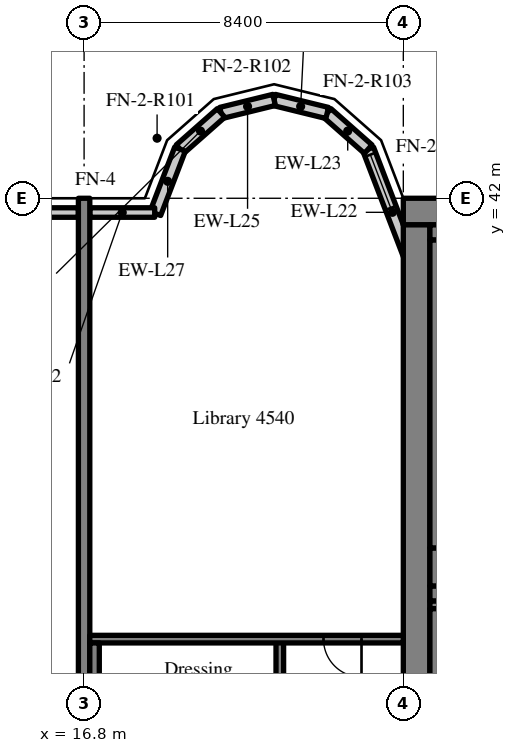
"""IFC4 building model, lengths in metres.
Left out: names, types, materials, properties, quantities, classifications, styles, units other than length and angle.
Written with IfcOpenShell. Run it as: python <this file> out.ifc"""

import sys

from ifc_helpers import new_model, si_unit, direction, frame, frame_2d, origin, place, context, subcontext, project, spatial, rectangle, extrude, source, transform, mapped, element, fill, save


model = new_model("IFC4")
c1 = context("Model", 3, precision=1e-05, world=origin(), true_north=direction((0.0, 1.0)))
c2 = subcontext(c1, "Body", "Model", "MODEL_VIEW")
j1 = project(units=[si_unit("LENGTHUNIT", "METRE"), si_unit("PLANEANGLEUNIT", "RADIAN")], contexts=[c1])
p1 = place(None, origin())
s1 = spatial("IfcSite", under=j1, at=p1, CompositionType="ELEMENT")
p2 = place(p1, origin())
s2 = spatial("IfcBuilding", under=s1, at=p2, CompositionType="ELEMENT")
p3 = place(p2, frame((0.0, 0.0, 185.8)))
s3 = spatial("IfcBuildingStorey", under=s2, at=p3, CompositionType="ELEMENT", Elevation=185.8)
m1 = source(origin(), c2, "Body", "SweptSolid", [
    extrude(rectangle(XDim=50.4, YDim=0.7, at=frame_2d((25.2, 0.0))), origin(), (0.0, 0.0, 1.0), 3.52),
])
p4 = place(p3, frame((25.2, 41.65, 0.0), z_axis=(0.0, 0.0, 1.0), x_axis=(1.0, 0.0, 0.0)))
e1 = element("IfcWall", 1, at=p4, inside=s3, PredefinedType="SHEAR", context=c2, shape_type="MappedRepresentation", body=[
    mapped(m1, transform((0.0, 0.0, 0.0), scale=1.0)),
])
m2 = source(origin(), c2, "Body", "SweptSolid", [
    extrude(rectangle(XDim=18.6, YDim=0.7, at=frame_2d((9.3, 0.0))), origin(), (0.0, 0.0, 1.0), 3.52),
])
p5 = place(p3, frame((25.55, 22.7, 0.0), z_axis=(0.0, 0.0, 1.0), x_axis=(0.0, 1.0, 0.0)))
e2 = element("IfcWall", 2, at=p5, inside=s3, PredefinedType="SHEAR", context=c2, shape_type="MappedRepresentation", body=[
    mapped(m2, transform((0.0, 0.0, 0.0), scale=1.0)),
])
m3 = source(origin(), c2, "Body", "SweptSolid", [
    extrude(rectangle(XDim=7.5, YDim=0.4, at=frame_2d((3.75, 0.0))), origin(), (0.0, 0.0, 1.0), 3.52),
])
p6 = place(p3, frame((25.9, 31.6, 0.0), z_axis=(0.0, 0.0, 1.0), x_axis=(1.0, 0.0, 0.0)))
e3 = element("IfcWall", 3, at=p6, inside=s3, PredefinedType="SHEAR", context=c2, shape_type="MappedRepresentation", body=[
    mapped(m3, transform((0.0, 0.0, 0.0), scale=1.0)),
])
m4 = source(origin(), c2, "Body", "SweptSolid", [
    extrude(rectangle(XDim=1.1, YDim=2.1, at=frame_2d((0.55, 1.05))), frame((0.0, 0.21, 0.0), z_axis=(0.0, -1.0, 0.0), x_axis=(1.0, 0.0, 0.0)), (0.0, 0.0, 1.0), 0.42),
])
p7 = place(p6, frame((5.825, 0.0, 0.0)))
e4 = element("IfcOpeningElement", 4, at=p7, cuts=e3, PredefinedType="OPENING", context=c2, shape_type="MappedRepresentation", body=[
    mapped(m4, transform((0.0, 0.0, 0.0), scale=1.0)),
])
m5 = source(origin(), c2, "Body", "SweptSolid", [
    extrude(rectangle(XDim=20.0, YDim=0.3, at=frame_2d((10.0, 0.0))), origin(), (0.0, 0.0, 1.0), 3.52),
])
p8 = place(p3, frame((16.8, 22.0, 0.0), z_axis=(0.0, 0.0, 1.0), x_axis=(0.0, 1.0, 0.0)))
e5 = element("IfcWall", 5, at=p8, inside=s3, PredefinedType="SHEAR", context=c2, shape_type="MappedRepresentation", body=[
    mapped(m5, transform((0.0, 0.0, 0.0), scale=1.0)),
])
m6 = source(origin(), c2, "Body", "SweptSolid", [
    extrude(rectangle(XDim=3.559, YDim=0.3, at=frame_2d((1.78, 0.0))), origin(), (0.0, 0.0, 1.0), 3.52),
])
p9 = place(p3, frame((25.55, 39.969, 0.0), z_axis=(0.0, 0.0, 1.0), x_axis=(-0.35779745313, 0.933799219604, 0.0)))
e6 = element("IfcWall", 6, at=p9, inside=s3, PredefinedType="SOLIDWALL", context=c2, shape_type="MappedRepresentation", body=[
    mapped(m6, transform((0.0, 0.0, 0.0), scale=1.0)),
])
m7 = source(origin(), c2, "Body", "SweptSolid", [
    extrude(rectangle(XDim=1.5, YDim=2.0, at=frame_2d((0.75, 1.0))), frame((0.0, 0.16, 0.0), z_axis=(0.0, -1.0, 0.0), x_axis=(1.0, 0.0, 0.0)), (0.0, 0.0, 1.0), 0.32),
])
p10 = place(p9, frame((1.903, 0.0, 0.9)))
e7 = element("IfcOpeningElement", 7, at=p10, cuts=e6, PredefinedType="OPENING", context=c2, shape_type="MappedRepresentation", body=[
    mapped(m7, transform((0.0, 0.0, 0.0), scale=1.0)),
])
m8 = source(origin(), c2, "Body", "SweptSolid", [
    extrude(rectangle(XDim=1.44, YDim=0.3, at=frame_2d((0.72, 0.0))), origin(), (0.0, 0.0, 1.0), 3.52),
])
p11 = place(p3, frame((24.277, 43.292, 0.0), z_axis=(0.0, 0.0, 1.0), x_axis=(-0.749649827867, 0.661834673902, 0.0)))
e8 = element("IfcWall", 8, at=p11, inside=s3, PredefinedType="SOLIDWALL", context=c2, shape_type="MappedRepresentation", body=[
    mapped(m8, transform((0.0, 0.0, 0.0), scale=1.0)),
])
m9 = source(origin(), c2, "Body", "SweptSolid", [
    extrude(rectangle(XDim=1.438, YDim=0.3, at=frame_2d((0.719, 0.0))), origin(), (0.0, 0.0, 1.0), 3.52),
])
p12 = place(p3, frame((23.197, 44.245, 0.0), z_axis=(0.0, 0.0, 1.0), x_axis=(-0.971152283879, 0.238460146601, 0.0)))
e9 = element("IfcWall", 9, at=p12, inside=s3, PredefinedType="SOLIDWALL", context=c2, shape_type="MappedRepresentation", body=[
    mapped(m9, transform((0.0, 0.0, 0.0), scale=1.0)),
])
m10 = source(origin(), c2, "Body", "SweptSolid", [
    extrude(rectangle(XDim=1.439, YDim=0.3, at=frame_2d((0.719, 0.0))), origin(), (0.0, 0.0, 1.0), 3.52),
])
p13 = place(p3, frame((21.8, 44.588, 0.0), z_axis=(0.0, 0.0, 1.0), x_axis=(-0.971161932466, -0.238420848351, 0.0)))
e10 = element("IfcWall", 10, at=p13, inside=s3, PredefinedType="SOLIDWALL", context=c2, shape_type="MappedRepresentation", body=[
    mapped(m10, transform((0.0, 0.0, 0.0), scale=1.0)),
])
m11 = source(origin(), c2, "Body", "SweptSolid", [
    extrude(rectangle(XDim=1.44, YDim=0.3, at=frame_2d((0.72, 0.0))), origin(), (0.0, 0.0, 1.0), 3.52),
])
p14 = place(p3, frame((20.403, 44.245, 0.0), z_axis=(0.0, 0.0, 1.0), x_axis=(-0.74957555648, -0.661918790432, 0.0)))
e11 = element("IfcWall", 11, at=p14, inside=s3, PredefinedType="SOLIDWALL", context=c2, shape_type="MappedRepresentation", body=[
    mapped(m11, transform((0.0, 0.0, 0.0), scale=1.0)),
])
m12 = source(origin(), c2, "Body", "SweptSolid", [
    extrude(rectangle(XDim=1.812, YDim=0.3, at=frame_2d((0.906, 0.0))), origin(), (0.0, 0.0, 1.0), 3.52),
])
p15 = place(p3, frame((19.323, 43.292, 0.0), z_axis=(0.0, 0.0, 1.0), x_axis=(-0.357877270961, -0.93376863244, 0.0)))
e12 = element("IfcWall", 12, at=p15, inside=s3, PredefinedType="SOLIDWALL", context=c2, shape_type="MappedRepresentation", body=[
    mapped(m12, transform((0.0, 0.0, 0.0), scale=1.0)),
])
m13 = source(origin(), c2, "Body", "SweptSolid", [
    extrude(rectangle(XDim=4.094, YDim=0.25, at=frame_2d((2.047, 0.0))), origin(), (0.0, 0.0, 1.0), 2.87),
])
p16 = place(p3, frame((16.65, 41.625, 0.0), z_axis=(0.0, 0.0, 1.0), x_axis=(-1.0, 0.0, 0.0)))
e13 = element("IfcWall", 13, at=p16, inside=s3, PredefinedType="SOLIDWALL", context=c2, shape_type="MappedRepresentation", body=[
    mapped(m13, transform((0.0, 0.0, 0.0), scale=1.0)),
])
m14 = source(origin(), c2, "Body", "SweptSolid", [
    extrude(rectangle(XDim=1.5, YDim=1.5, at=frame_2d((0.75, 0.75))), frame((0.0, 0.135, 0.0), z_axis=(0.0, -1.0, 0.0), x_axis=(1.0, 0.0, 0.0)), (0.0, 0.0, 1.0), 0.27),
])
p17 = place(p16, frame((1.297, 0.0, 0.9)))
e14 = element("IfcOpeningElement", 14, at=p17, cuts=e13, PredefinedType="OPENING", context=c2, shape_type="MappedRepresentation", body=[
    mapped(m14, transform((0.0, 0.0, 0.0), scale=1.0)),
])
m15 = source(origin(), c2, "Body", "SweptSolid", [
    extrude(rectangle(XDim=1.708, YDim=0.25, at=frame_2d((0.854, 0.0))), origin(), (0.0, 0.0, 1.0), 2.87),
])
p18 = place(p3, frame((18.658, 41.625, 0.0), z_axis=(0.0, 0.0, 1.0), x_axis=(-1.0, 0.0, 0.0)))
e15 = element("IfcWall", 15, at=p18, inside=s3, PredefinedType="SOLIDWALL", context=c2, shape_type="MappedRepresentation", body=[
    mapped(m15, transform((0.0, 0.0, 0.0), scale=1.0)),
])
m16 = source(origin(), c2, "Body", "SweptSolid", [
    extrude(rectangle(XDim=8.3, YDim=0.2, at=frame_2d((4.15, 0.0))), origin(), (0.0, 0.0, 1.0), 3.52),
])
p19 = place(p3, frame((21.95, 22.1, 0.0), z_axis=(0.0, 0.0, 1.0), x_axis=(0.0, 1.0, 0.0)))
e16 = element("IfcWall", 16, at=p19, inside=s3, PredefinedType="SOLIDWALL", context=c2, shape_type="MappedRepresentation", body=[
    mapped(m16, transform((0.0, 0.0, 0.0), scale=1.0)),
])
m17 = source(origin(), c2, "Body", "SweptSolid", [
    extrude(rectangle(XDim=1.2, YDim=2.1, at=frame_2d((0.6, 1.05))), frame((0.0, 0.11, 0.0), z_axis=(0.0, -1.0, 0.0), x_axis=(1.0, 0.0, 0.0)), (0.0, 0.0, 1.0), 0.22),
])
p20 = place(p19, frame((0.6, 0.0, 0.0)))
e17 = element("IfcOpeningElement", 17, at=p20, cuts=e16, PredefinedType="OPENING", context=c2, shape_type="MappedRepresentation", body=[
    mapped(m17, transform((0.0, 0.0, 0.0), scale=1.0)),
])
m18 = source(origin(), c2, "Body", "SweptSolid", [
    extrude(rectangle(XDim=8.25, YDim=0.2, at=frame_2d((4.125, 0.0))), origin(), (0.0, 0.0, 1.0), 3.52),
])
p21 = place(p3, frame((16.95, 30.4, 0.0), z_axis=(0.0, 0.0, 1.0), x_axis=(1.0, 0.0, 0.0)))
e18 = element("IfcWall", 18, at=p21, inside=s3, PredefinedType="SOLIDWALL", context=c2, shape_type="MappedRepresentation", body=[
    mapped(m18, transform((0.0, 0.0, 0.0), scale=1.0)),
])
m19 = source(origin(), c2, "Body", "SweptSolid", [
    extrude(rectangle(XDim=1.0, YDim=2.1, at=frame_2d((0.5, 1.05))), frame((0.0, 0.11, 0.0), z_axis=(0.0, -1.0, 0.0), x_axis=(1.0, 0.0, 0.0)), (0.0, 0.0, 1.0), 0.22),
])
p22 = place(p21, frame((6.15, 0.0, 0.0)))
e19 = element("IfcOpeningElement", 19, at=p22, cuts=e18, PredefinedType="OPENING", context=c2, shape_type="MappedRepresentation", body=[
    mapped(m19, transform((0.0, 0.0, 0.0), scale=1.0)),
])
m20 = source(origin(), c2, "Body", "SweptSolid", [
    extrude(rectangle(XDim=5.05, YDim=0.2, at=frame_2d((2.525, 0.0))), origin(), (0.0, 0.0, 1.0), 3.52),
])
p23 = place(p3, frame((25.9, 31.3, 0.0), z_axis=(0.0, 0.0, 1.0), x_axis=(1.0, 0.0, 0.0)))
e20 = element("IfcWall", 20, at=p23, inside=s3, PredefinedType="SOLIDWALL", context=c2, shape_type="MappedRepresentation", body=[
    mapped(m20, transform((0.0, 0.0, 0.0), scale=1.0)),
])
m21 = source(origin(), c2, "Body", "SweptSolid", [
    extrude(rectangle(XDim=8.1, YDim=0.4, at=frame_2d((4.05, 0.0))), origin(), (0.0, 0.0, 1.0), 3.52),
])
p24 = place(p3, frame((26.1, 23.1, 0.0), z_axis=(0.0, 0.0, 1.0), x_axis=(0.0, 1.0, 0.0)))
e21 = element("IfcWall", 21, at=p24, inside=s3, PredefinedType="SOLIDWALL", context=c2, shape_type="MappedRepresentation", body=[
    mapped(m21, transform((0.0, 0.0, 0.0), scale=1.0)),
])
m22 = source(origin(), c2, "Body", "SweptSolid", [
    extrude(rectangle(XDim=8.1, YDim=0.25, at=frame_2d((4.05, 0.0))), origin(), (0.0, 0.0, 1.0), 3.52),
])
p25 = place(p3, frame((17.075, 22.2, 0.0), z_axis=(0.0, 0.0, 1.0), x_axis=(0.0, 1.0, 0.0)))
e22 = element("IfcWall", 22, at=p25, inside=s3, PredefinedType="SOLIDWALL", context=c2, shape_type="MappedRepresentation", body=[
    mapped(m22, transform((0.0, 0.0, 0.0), scale=1.0)),
])
m23 = source(origin(), c2, "Body", "SweptSolid", [
    extrude(rectangle(XDim=5.05, YDim=0.4, at=frame_2d((2.525, 0.0))), origin(), (0.0, 0.0, 1.0), 3.52),
])
p26 = place(p3, frame((25.9, 41.1, 0.0), z_axis=(0.0, 0.0, 1.0), x_axis=(1.0, 0.0, 0.0)))
e23 = element("IfcWall", 23, at=p26, inside=s3, PredefinedType="SOLIDWALL", context=c2, shape_type="MappedRepresentation", body=[
    mapped(m23, transform((0.0, 0.0, 0.0), scale=1.0)),
])
m24 = source(origin(), c2, "Body", "SweptSolid", [
    extrude(rectangle(XDim=5.05, YDim=1.0, at=frame_2d((2.525, 0.0))), origin(), (0.0, 0.0, 1.0), 3.52),
])
p27 = place(p3, frame((25.9, 32.3, 0.0), z_axis=(0.0, 0.0, 1.0), x_axis=(1.0, 0.0, 0.0)))
e24 = element("IfcWall", 24, at=p27, inside=s3, PredefinedType="SOLIDWALL", context=c2, shape_type="MappedRepresentation", body=[
    mapped(m24, transform((0.0, 0.0, 0.0), scale=1.0)),
])
p28 = place(p3, frame((26.1, 32.8, 0.0), z_axis=(0.0, 0.0, 1.0), x_axis=(0.0, 1.0, 0.0)))
e25 = element("IfcWall", 25, at=p28, inside=s3, PredefinedType="SOLIDWALL", context=c2, shape_type="MappedRepresentation", body=[
    mapped(m21, transform((0.0, 0.0, 0.0), scale=1.0)),
])
m25 = source(origin(), c2, "Body", "SweptSolid", [
    extrude(rectangle(XDim=1.5, YDim=2.0, at=frame_2d((0.75, 1.0))), frame((0.0, 0.03, 0.0), z_axis=(0.0, -1.0, 0.0), x_axis=(1.0, 0.0, 0.0)), (0.0, 0.0, 1.0), 0.06),
])
p29 = place(p10, origin())
e26 = element("IfcWindow", 26, at=p29, inside=s3, PartitioningType="SINGLE_PANEL", PredefinedType="WINDOW", context=c2, shape_type="MappedRepresentation", body=[
    mapped(m25, transform((0.0, 0.0, 0.0), scale=1.0)),
])
fill(e7, e26)
m26 = source(origin(), c2, "Body", "SweptSolid", [
    extrude(rectangle(XDim=1.0, YDim=2.1, at=frame_2d((0.5, 1.05))), frame((0.0, 0.025, 0.0), z_axis=(0.0, -1.0, 0.0), x_axis=(1.0, 0.0, 0.0)), (0.0, 0.0, 1.0), 0.05),
])
p30 = place(p22, origin())
e27 = element("IfcDoor", 27, at=p30, inside=s3, OperationType="SINGLE_SWING_RIGHT", PredefinedType="DOOR", context=c2, shape_type="MappedRepresentation", body=[
    mapped(m26, transform((0.0, 0.0, 0.0), scale=1.0)),
])
fill(e19, e27)
save(model, sys.argv[1])
